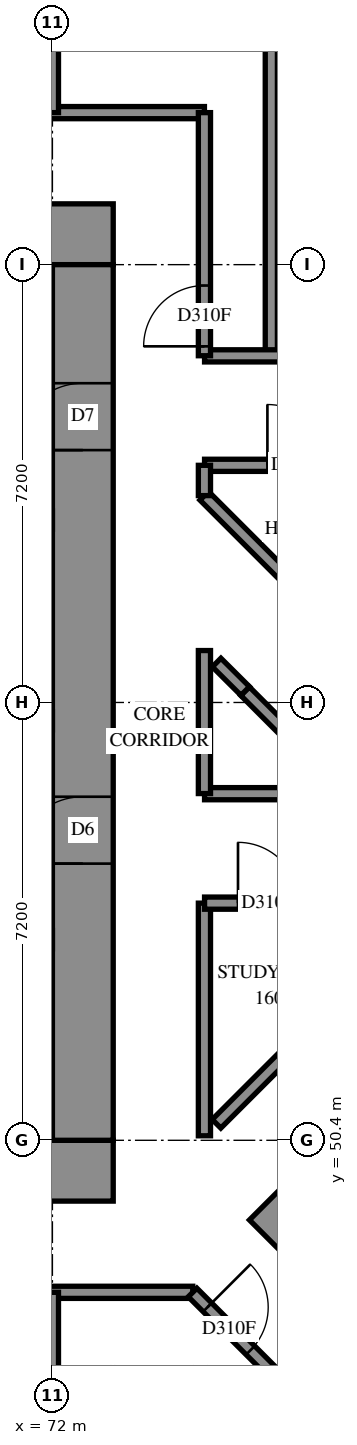
"""IFC4 building model, lengths in metres.
Left out: names, types, materials, properties, quantities, classifications, styles, units other than length and angle.
Written with IfcOpenShell. Run it as: python <this file> out.ifc"""

import sys

from ifc_helpers import new_model, si_unit, direction, frame, frame_2d, origin, place, context, subcontext, project, spatial, rectangle, extrude, element, fill, save


model = new_model("IFC4")
c1 = context("Model", 3, precision=1e-05, world=origin(), true_north=direction((0.0, 1.0)))
c2 = subcontext(c1, "Body", "Model", "MODEL_VIEW")
j1 = project(units=[si_unit("LENGTHUNIT", "METRE"), si_unit("PLANEANGLEUNIT", "RADIAN")], contexts=[c1])
p1 = place(None, origin())
s1 = spatial("IfcSite", under=j1, at=p1, CompositionType="ELEMENT")
p2 = place(p1, origin())
s2 = spatial("IfcBuilding", under=s1, at=p2, CompositionType="ELEMENT")
p3 = place(p2, frame((0.0, 0.0, 61.0)))
s3 = spatial("IfcBuildingStorey", under=s2, at=p3, CompositionType="ELEMENT", Elevation=61.0)
p4 = place(p3, frame((56.6, 49.9, -0.3), z_axis=(0.0, 0.0, 1.0), x_axis=(1.0, 0.0, 0.0)))
e1 = element("IfcWall", 1, at=p4, inside=s3, PredefinedType="SHEAR", context=c2, shape_type="SweptSolid", body=[
    extrude(rectangle(XDim=16.4, YDim=1.0, at=frame_2d((8.2, 0.0))), origin(), (0.0, 0.0, 1.0), 2.7),
])
p5 = place(p3, frame((56.6, 65.3, -0.3), z_axis=(0.0, 0.0, 1.0), x_axis=(1.0, 0.0, 0.0)))
e2 = element("IfcWall", 2, at=p5, inside=s3, PredefinedType="SHEAR", context=c2, shape_type="SweptSolid", body=[
    extrude(rectangle(XDim=16.4, YDim=1.0, at=frame_2d((8.2, 0.0))), origin(), (0.0, 0.0, 1.0), 2.7),
])
p6 = place(p5, frame((11.0, 0.0, 0.3)))
e3 = element("IfcOpeningElement", 3, at=p6, cuts=e2, PredefinedType="OPENING", context=c2, shape_type="SweptSolid", body=[
    extrude(rectangle(XDim=0.8, YDim=2.1, at=frame_2d((0.4, 1.05))), frame((0.0, 0.51, 0.0), z_axis=(0.0, -1.0, 0.0), x_axis=(1.0, 0.0, 0.0)), (0.0, 0.0, 1.0), 1.02),
])
p7 = place(p3, frame((72.5, 50.4, -0.3), z_axis=(0.0, 0.0, 1.0), x_axis=(0.0, 1.0, 0.0)))
e4 = element("IfcWall", 4, at=p7, inside=s3, PredefinedType="SHEAR", context=c2, shape_type="SweptSolid", body=[
    extrude(rectangle(XDim=14.4, YDim=1.0, at=frame_2d((7.2, 0.0))), origin(), (0.0, 0.0, 1.0), 2.7),
])
p8 = place(p7, frame((4.55, 0.0, 0.3)))
e5 = element("IfcOpeningElement", 5, at=p8, cuts=e4, PredefinedType="OPENING", context=c2, shape_type="SweptSolid", body=[
    extrude(rectangle(XDim=1.1, YDim=2.1, at=frame_2d((0.55, 1.05))), frame((0.0, 0.51, 0.0), z_axis=(0.0, -1.0, 0.0), x_axis=(1.0, 0.0, 0.0)), (0.0, 0.0, 1.0), 1.02),
])
p9 = place(p7, frame((11.35, 0.0, 0.3)))
e6 = element("IfcOpeningElement", 6, at=p9, cuts=e4, PredefinedType="OPENING", context=c2, shape_type="SweptSolid", body=[
    extrude(rectangle(XDim=1.1, YDim=2.1, at=frame_2d((0.55, 1.05))), frame((0.0, 0.51, 0.0), z_axis=(0.0, -1.0, 0.0), x_axis=(1.0, 0.0, 0.0)), (0.0, 0.0, 1.0), 1.02),
])
p10 = place(p3, frame((75.594, 49.443, -0.3), z_axis=(0.0, 0.0, 1.0), x_axis=(0.7071037324, -0.70710983, 0.0)))
e7 = element("IfcWall", 7, at=p10, inside=s3, PredefinedType="SHEAR", context=c2, shape_type="SweptSolid", body=[
    extrude(rectangle(XDim=16.4, YDim=1.0, at=frame_2d((8.2, 0.0))), origin(), (0.0, 0.0, 1.0), 2.7),
])
p11 = place(p3, frame((55.1, 67.3, 0.0), z_axis=(0.0, 0.0, 1.0), x_axis=(1.0, 0.0, 0.0)))
e8 = element("IfcWall", 8, at=p11, inside=s3, PredefinedType="PARTITIONING", context=c2, shape_type="SweptSolid", body=[
    extrude(rectangle(XDim=19.4, YDim=0.2, at=frame_2d((9.7, 0.0))), origin(), (0.0, 0.0, 1.0), 3.1),
])
p12 = place(p11, frame((6.361, 0.0, 0.0)))
e9 = element("IfcOpeningElement", 9, at=p12, cuts=e8, PredefinedType="OPENING", context=c2, shape_type="SweptSolid", body=[
    extrude(rectangle(XDim=0.9, YDim=2.1, at=frame_2d((0.45, 1.05))), frame((0.0, 0.11, 0.0), z_axis=(0.0, -1.0, 0.0), x_axis=(1.0, 0.0, 0.0)), (0.0, 0.0, 1.0), 0.22),
])
p13 = place(p11, frame((13.561, 0.0, 0.0)))
e10 = element("IfcOpeningElement", 10, at=p13, cuts=e8, PredefinedType="OPENING", context=c2, shape_type="SweptSolid", body=[
    extrude(rectangle(XDim=0.9, YDim=2.1, at=frame_2d((0.45, 1.05))), frame((0.0, 0.11, 0.0), z_axis=(0.0, -1.0, 0.0), x_axis=(1.0, 0.0, 0.0)), (0.0, 0.0, 1.0), 0.22),
])
p14 = place(p3, frame((55.1, 47.9, 0.0), z_axis=(0.0, 0.0, 1.0), x_axis=(1.0, 0.0, 0.0)))
e11 = element("IfcWall", 11, at=p14, inside=s3, PredefinedType="PARTITIONING", context=c2, shape_type="SweptSolid", body=[
    extrude(rectangle(XDim=19.208, YDim=0.2, at=frame_2d((9.604, 0.0))), origin(), (0.0, 0.0, 1.0), 3.1),
])
p15 = place(p14, frame((6.399, 0.0, 0.0)))
e12 = element("IfcOpeningElement", 12, at=p15, cuts=e11, PredefinedType="OPENING", context=c2, shape_type="SweptSolid", body=[
    extrude(rectangle(XDim=0.9, YDim=2.1, at=frame_2d((0.45, 1.05))), frame((0.0, 0.11, 0.0), z_axis=(0.0, -1.0, 0.0), x_axis=(1.0, 0.0, 0.0)), (0.0, 0.0, 1.0), 0.22),
])
p16 = place(p14, frame((13.561, 0.0, 0.0)))
e13 = element("IfcOpeningElement", 13, at=p16, cuts=e11, PredefinedType="OPENING", context=c2, shape_type="SweptSolid", body=[
    extrude(rectangle(XDim=0.9, YDim=2.1, at=frame_2d((0.45, 1.05))), frame((0.0, 0.11, 0.0), z_axis=(0.0, -1.0, 0.0), x_axis=(1.0, 0.0, 0.0)), (0.0, 0.0, 1.0), 0.22),
])
p17 = place(p3, frame((75.6, 63.3, 0.0), z_axis=(0.0, 0.0, 1.0), x_axis=(0.0, 1.0, 0.0)))
e14 = element("IfcWall", 14, at=p17, inside=s3, PredefinedType="PARTITIONING", context=c2, shape_type="SweptSolid", body=[
    extrude(rectangle(XDim=9.467, YDim=0.2, at=frame_2d((4.734, 0.0))), origin(), (0.0, 0.0, 1.0), 3.1),
])
p18 = place(p3, frame((74.699, 50.671, 0.0), z_axis=(0.0, 0.0, 1.0), x_axis=(0.7071067812, 0.7071067812, 0.0)))
e15 = element("IfcWall", 15, at=p18, inside=s3, PredefinedType="PARTITIONING", context=c2, shape_type="SweptSolid", body=[
    extrude(rectangle(XDim=5.131, YDim=0.2, at=frame_2d((2.565, 0.0))), origin(), (0.0, 0.0, 1.0), 3.1),
])
p19 = place(p3, frame((74.502, 63.3, 0.0), z_axis=(0.0, 0.0, 1.0), x_axis=(1.0, 0.0, 0.0)))
e16 = element("IfcWall", 16, at=p19, inside=s3, PredefinedType="PARTITIONING", context=c2, shape_type="SweptSolid", body=[
    extrude(rectangle(XDim=4.698, YDim=0.2, at=frame_2d((2.349, 0.0))), origin(), (0.0, 0.0, 1.0), 3.1),
])
p20 = place(p19, frame((1.963, 0.0, 0.0)))
e17 = element("IfcOpeningElement", 17, at=p20, cuts=e16, PredefinedType="OPENING", context=c2, shape_type="SweptSolid", body=[
    extrude(rectangle(XDim=1.0, YDim=2.1, at=frame_2d((0.5, 1.05))), frame((0.0, 0.11, 0.0), z_axis=(0.0, -1.0, 0.0), x_axis=(1.0, 0.0, 0.0)), (0.0, 0.0, 1.0), 0.22),
])
p21 = place(p3, frame((74.502, 61.5, 0.0), z_axis=(0.0, 0.0, 1.0), x_axis=(1.0, 0.0, 0.0)))
e18 = element("IfcWall", 18, at=p21, inside=s3, PredefinedType="PARTITIONING", context=c2, shape_type="SweptSolid", body=[
    extrude(rectangle(XDim=4.698, YDim=0.2, at=frame_2d((2.349, 0.0))), origin(), (0.0, 0.0, 1.0), 3.1),
])
p22 = place(p21, frame((1.034, 0.0, 0.0)))
e19 = element("IfcOpeningElement", 19, at=p22, cuts=e18, PredefinedType="OPENING", context=c2, shape_type="SweptSolid", body=[
    extrude(rectangle(XDim=1.0, YDim=2.1, at=frame_2d((0.5, 1.05))), frame((0.0, 0.11, 0.0), z_axis=(0.0, -1.0, 0.0), x_axis=(1.0, 0.0, 0.0)), (0.0, 0.0, 1.0), 0.22),
])
p23 = place(p3, frame((74.305, 47.897, 0.0), z_axis=(0.0, 0.0, 1.0), x_axis=(0.7071067812, -0.7071067812, 0.0)))
e20 = element("IfcWall", 20, at=p23, inside=s3, PredefinedType="PARTITIONING", context=c2, shape_type="SweptSolid", body=[
    extrude(rectangle(XDim=4.302, YDim=0.2, at=frame_2d((2.151, 0.0))), origin(), (0.0, 0.0, 1.0), 3.1),
])
p24 = place(p23, frame((0.345, 0.0, 0.0)))
e21 = element("IfcOpeningElement", 21, at=p24, cuts=e20, PredefinedType="OPENING", context=c2, shape_type="SweptSolid", body=[
    extrude(rectangle(XDim=1.0, YDim=2.1, at=frame_2d((0.5, 1.05))), frame((0.0, 0.11, 0.0), z_axis=(0.0, -1.0, 0.0), x_axis=(1.0, 0.0, 0.0)), (0.0, 0.0, 1.0), 0.22),
])
for number, where, z_axis, x_axis in (
    (22, (72.0, 67.3, 0.0), (0.0, 0.0, 1.0), (0.0, 1.0, 0.0)),
    (23, (72.0, 43.8, 0.0), (0.0, 0.0, 1.0), (0.0, 1.0, 0.0)),
):
    element("IfcWall", number, at=place(p3, frame(where, z_axis=z_axis, x_axis=x_axis)), inside=s3, PredefinedType="PARTITIONING", context=c2, shape_type="SweptSolid", body=[
        extrude(rectangle(XDim=4.1, YDim=0.2, at=frame_2d((2.05, 0.0))), origin(), (0.0, 0.0, 1.0), 3.1),
    ])
p25 = place(p3, frame((74.497, 60.999, 0.0), z_axis=(0.0, 0.0, 1.0), x_axis=(0.7071067812, -0.7071067812, 0.0)))
e24 = element("IfcWall", 24, at=p25, inside=s3, PredefinedType="PARTITIONING", context=c2, shape_type="SweptSolid", body=[
    extrude(rectangle(XDim=4.028, YDim=0.2, at=frame_2d((2.014, 0.0))), origin(), (0.0, 0.0, 1.0), 3.1),
])
p26 = place(p3, frame((74.5, 63.302, 0.0), z_axis=(0.0, 0.0, 1.0), x_axis=(0.0, 1.0, 0.0)))
e25 = element("IfcWall", 25, at=p26, inside=s3, PredefinedType="PARTITIONING", context=c2, shape_type="SweptSolid", body=[
    extrude(rectangle(XDim=3.998, YDim=0.2, at=frame_2d((1.999, 0.0))), origin(), (0.0, 0.0, 1.0), 3.1),
])
p27 = place(p26, frame((0.154, 0.0, 0.0)))
e26 = element("IfcOpeningElement", 26, at=p27, cuts=e25, PredefinedType="OPENING", context=c2, shape_type="SweptSolid", body=[
    extrude(rectangle(XDim=1.0, YDim=2.1, at=frame_2d((0.5, 1.05))), frame((0.0, 0.11, 0.0), z_axis=(0.0, -1.0, 0.0), x_axis=(1.0, 0.0, 0.0)), (0.0, 0.0, 1.0), 0.22),
])
p28 = place(p3, frame((74.5, 50.474, 0.0), z_axis=(0.0, 0.0, 1.0), x_axis=(0.0, 1.0, 0.0)))
e27 = element("IfcWall", 27, at=p28, inside=s3, PredefinedType="PARTITIONING", context=c2, shape_type="SweptSolid", body=[
    extrude(rectangle(XDim=3.826, YDim=0.2, at=frame_2d((1.913, 0.0))), origin(), (0.0, 0.0, 1.0), 3.1),
])
p29 = place(p3, frame((74.502, 54.3, 0.0), z_axis=(0.0, 0.0, 1.0), x_axis=(1.0, 0.0, 0.0)))
e28 = element("IfcWall", 28, at=p29, inside=s3, PredefinedType="PARTITIONING", context=c2, shape_type="SweptSolid", body=[
    extrude(rectangle(XDim=3.824, YDim=0.2, at=frame_2d((1.912, 0.0))), origin(), (0.0, 0.0, 1.0), 3.1),
])
p30 = place(p29, frame((0.55, 0.0, 0.0)))
e29 = element("IfcOpeningElement", 29, at=p30, cuts=e28, PredefinedType="OPENING", context=c2, shape_type="SweptSolid", body=[
    extrude(rectangle(XDim=1.0, YDim=2.1, at=frame_2d((0.5, 1.05))), frame((0.0, 0.11, 0.0), z_axis=(0.0, -1.0, 0.0), x_axis=(1.0, 0.0, 0.0)), (0.0, 0.0, 1.0), 0.22),
])
p31 = place(p3, frame((75.168, 57.786, 0.0), z_axis=(0.0, 0.0, 1.0), x_axis=(0.7066870088, -0.7075263045, 0.0)))
e30 = element("IfcWall", 30, at=p31, inside=s3, PredefinedType="PARTITIONING", context=c2, shape_type="SweptSolid", body=[
    extrude(rectangle(XDim=2.383, YDim=0.2, at=frame_2d((1.192, 0.0))), origin(), (0.0, 0.0, 1.0), 3.1),
])
for number, where, z_axis, x_axis in (
    (31, (74.502, 56.1, 0.0), (0.0, 0.0, 1.0), (1.0, 0.0, 0.0)),
    (32, (74.5, 56.102, 0.0), (0.0, 0.0, 1.0), (0.0, 1.0, 0.0)),
):
    element("IfcWall", number, at=place(p3, frame(where, z_axis=z_axis, x_axis=x_axis)), inside=s3, PredefinedType="PARTITIONING", context=c2, shape_type="SweptSolid", body=[
        extrude(rectangle(XDim=2.352, YDim=0.2, at=frame_2d((1.176, 0.0))), origin(), (0.0, 0.0, 1.0), 3.1),
    ])
p32 = place(p3, frame((74.701, 58.257, 0.0), z_axis=(0.0, 0.0, 1.0), x_axis=(0.7086128608, -0.7055974869, 0.0)))
e33 = element("IfcWall", 33, at=p32, inside=s3, PredefinedType="PARTITIONING", context=c2, shape_type="SweptSolid", body=[
    extrude(rectangle(XDim=0.663, YDim=0.2, at=frame_2d((0.332, 0.0))), origin(), (0.0, 0.0, 1.0), 3.1),
])
p33 = place(p3, frame((74.5, 61.002, 0.0), z_axis=(0.0, 0.0, 1.0), x_axis=(0.0, 1.0, 0.0)))
e34 = element("IfcWall", 34, at=p33, inside=s3, PredefinedType="PARTITIONING", context=c2, shape_type="SweptSolid", body=[
    extrude(rectangle(XDim=0.498, YDim=0.2, at=frame_2d((0.249, 0.0))), origin(), (0.0, 0.0, 1.0), 3.1),
])
p34 = place(p8, origin())
e35 = element("IfcDoor", 35, at=p34, inside=s3, OperationType="DOUBLE_DOOR_SINGLE_SWING", PredefinedType="DOOR", context=c2, shape_type="SweptSolid", body=[
    extrude(rectangle(XDim=1.1, YDim=2.1, at=frame_2d((0.55, 1.05))), frame((0.0, 0.025, 0.0), z_axis=(0.0, -1.0, 0.0), x_axis=(1.0, 0.0, 0.0)), (0.0, 0.0, 1.0), 0.05),
])
fill(e5, e35)
p35 = place(p9, origin())
e36 = element("IfcDoor", 36, at=p35, inside=s3, OperationType="SINGLE_SWING_RIGHT", PredefinedType="DOOR", context=c2, shape_type="SweptSolid", body=[
    extrude(rectangle(XDim=1.1, YDim=2.1, at=frame_2d((0.55, 1.05))), frame((0.0, 0.025, 0.0), z_axis=(0.0, -1.0, 0.0), x_axis=(1.0, 0.0, 0.0)), (0.0, 0.0, 1.0), 0.05),
])
fill(e6, e36)
p36 = place(p30, origin())
e37 = element("IfcDoor", 37, at=p36, inside=s3, OperationType="SINGLE_SWING_RIGHT", PredefinedType="DOOR", context=c2, shape_type="SweptSolid", body=[
    extrude(rectangle(XDim=1.0, YDim=2.1, at=frame_2d((0.5, 1.05))), frame((0.0, 0.025, 0.0), z_axis=(0.0, -1.0, 0.0), x_axis=(1.0, 0.0, 0.0)), (0.0, 0.0, 1.0), 0.05),
])
fill(e29, e37)
p37 = place(p27, origin())
e38 = element("IfcDoor", 38, at=p37, inside=s3, OperationType="SINGLE_SWING_RIGHT", PredefinedType="DOOR", context=c2, shape_type="SweptSolid", body=[
    extrude(rectangle(XDim=1.0, YDim=2.1, at=frame_2d((0.5, 1.05))), frame((0.0, 0.025, 0.0), z_axis=(0.0, -1.0, 0.0), x_axis=(1.0, 0.0, 0.0)), (0.0, 0.0, 1.0), 0.05),
])
fill(e26, e38)
p38 = place(p24, origin())
e39 = element("IfcDoor", 39, at=p38, inside=s3, OperationType="SINGLE_SWING_LEFT", PredefinedType="DOOR", context=c2, shape_type="SweptSolid", body=[
    extrude(rectangle(XDim=1.0, YDim=2.1, at=frame_2d((0.5, 1.05))), frame((0.0, 0.025, 0.0), z_axis=(0.0, -1.0, 0.0), x_axis=(1.0, 0.0, 0.0)), (0.0, 0.0, 1.0), 0.05),
])
fill(e21, e39)
p39 = place(p22, origin())
e40 = element("IfcDoor", 40, at=p39, inside=s3, OperationType="SINGLE_SWING_RIGHT", PredefinedType="DOOR", context=c2, shape_type="SweptSolid", body=[
    extrude(rectangle(XDim=1.0, YDim=2.1, at=frame_2d((0.5, 1.05))), frame((0.0, 0.025, 0.0), z_axis=(0.0, -1.0, 0.0), x_axis=(1.0, 0.0, 0.0)), (0.0, 0.0, 1.0), 0.05),
])
fill(e19, e40)
save(model, sys.argv[1])
